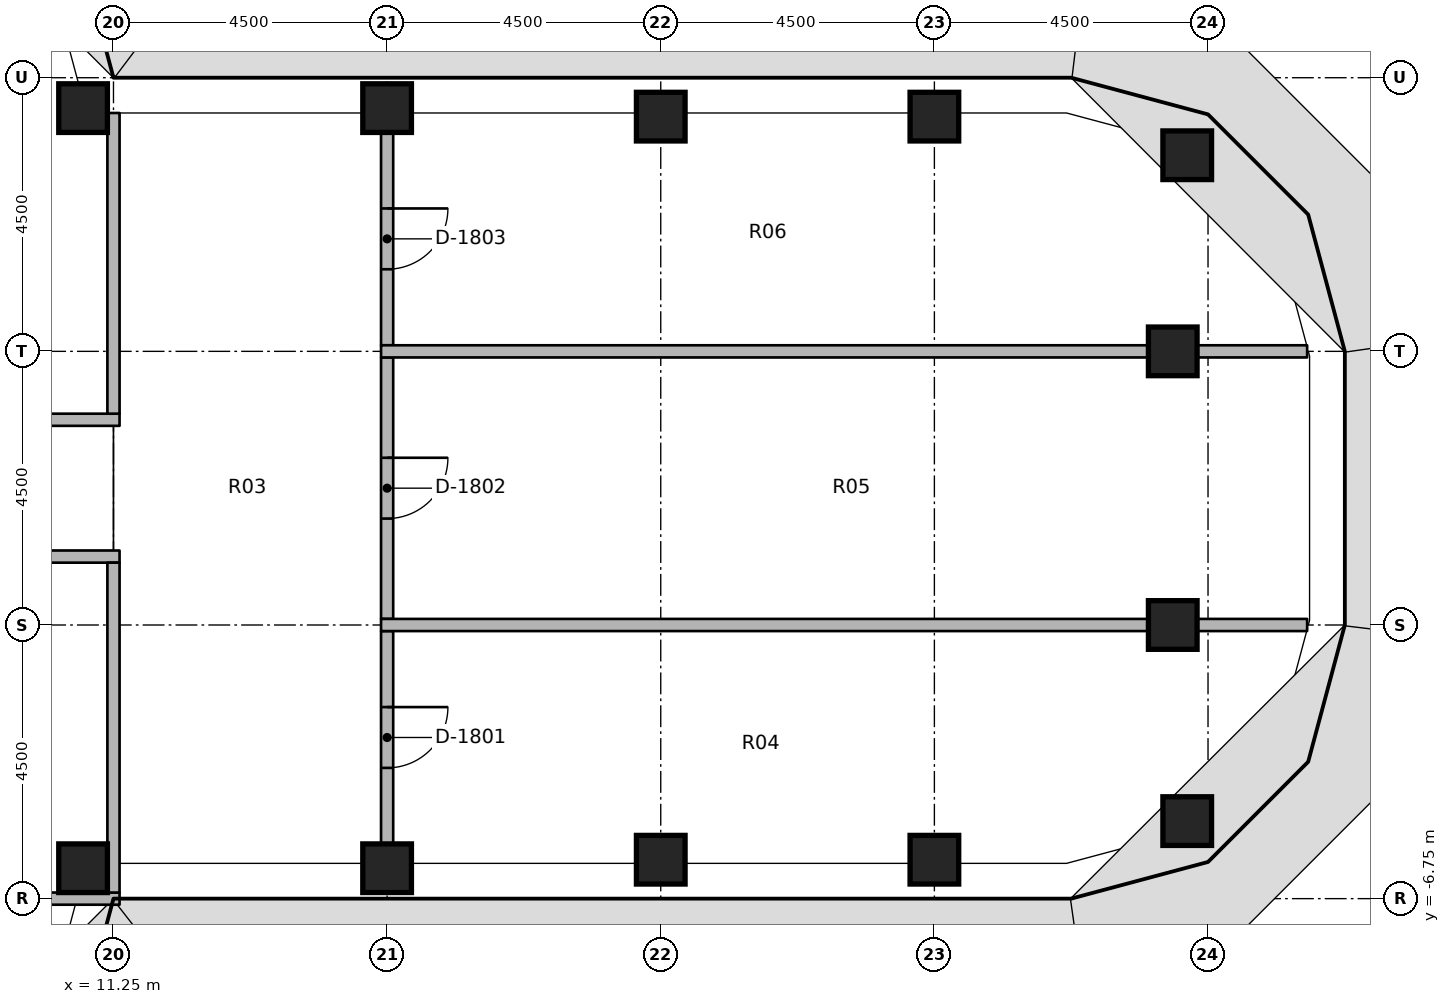
"""IFC4 building model, lengths in metres.
Left out: names, types, materials, properties, quantities, classifications, styles, units other than length and angle.
Written with IfcOpenShell. Run it as: python <this file> out.ifc"""

import sys

from ifc_helpers import new_model, si_unit, direction, frame, frame_2d, origin, origin_2d, place, context, subcontext, project, spatial, rectangle, extrude, element, fill, save


model = new_model("IFC4")
c1 = context("Model", 3, precision=1e-05, world=origin(), true_north=direction((0.0, 1.0)))
c2 = subcontext(c1, "Body", "Model", "MODEL_VIEW")
j1 = project(units=[si_unit("LENGTHUNIT", "METRE"), si_unit("PLANEANGLEUNIT", "RADIAN")], contexts=[c1])
p1 = place(None, origin())
s1 = spatial("IfcSite", under=j1, at=p1, CompositionType="ELEMENT")
p2 = place(p1, origin())
s2 = spatial("IfcBuilding", under=s1, at=p2, CompositionType="ELEMENT")
p3 = place(p2, frame((0.0, 0.0, 171.4)))
s3 = spatial("IfcBuildingStorey", under=s2, at=p3, CompositionType="ELEMENT", Elevation=171.4)
for number, where, z_axis, x_axis in (
    (1, (10.75, -6.25, 0.0), (0.0, 0.0, 1.0), (1.0, 0.0, 0.0)),
    (2, (10.75, 6.25, 0.0), (0.0, 0.0, 1.0), (1.0, 0.0, 0.0)),
    (3, (15.75, -6.25, 0.0), (0.0, 0.0, 1.0), (1.0, 0.0, 0.0)),
    (4, (15.75, 6.25, 0.0), (0.0, 0.0, 1.0), (1.0, 0.0, 0.0)),
    (5, (20.25, -6.11, 0.0), (0.0, 0.0, 1.0), (1.0, 0.0, 0.0)),
    (6, (20.25, 6.11, 0.0), (0.0, 0.0, 1.0), (1.0, 0.0, 0.0)),
    (7, (24.75, -6.11, 0.0), (0.0, 0.0, 1.0), (1.0, 0.0, 0.0)),
    (8, (24.75, 6.11, 0.0), (0.0, 0.0, 1.0), (1.0, 0.0, 0.0)),
    (9, (28.908, -5.475, 0.0), (0.0, 0.0, 1.0), (1.0, 0.0, 0.0)),
    (10, (28.67, -2.25, 0.0), (0.0, 0.0, 1.0), (1.0, 0.0, 0.0)),
    (11, (28.67, 2.25, 0.0), (0.0, 0.0, 1.0), (1.0, 0.0, 0.0)),
    (12, (28.908, 5.475, 0.0), (0.0, 0.0, 1.0), (1.0, 0.0, 0.0)),
):
    element("IfcColumn", number, at=place(p3, frame(where, z_axis=z_axis, x_axis=x_axis)), inside=s3, PredefinedType="COLUMN", context=c2, shape_type="SweptSolid", body=[
        extrude(rectangle(XDim=0.8, YDim=0.8, at=origin_2d()), origin(), (0.0, 0.0, 1.0), 3.65),
    ])
p4 = place(p3, frame((6.65, 1.125, 0.0), z_axis=(0.0, 0.0, 1.0), x_axis=(1.0, 0.0, 0.0)))
e13 = element("IfcWall", 13, at=p4, inside=s3, PredefinedType="PARTITIONING", context=c2, shape_type="SweptSolid", body=[
    extrude(rectangle(XDim=4.7, YDim=0.2, at=frame_2d((2.35, 0.0))), origin(), (0.0, 0.0, 1.0), 2.75),
])
p5 = place(p4, frame((1.85, 0.0, 0.0)))
e14 = element("IfcOpeningElement", 14, at=p5, cuts=e13, PredefinedType="OPENING", context=c2, shape_type="SweptSolid", body=[
    extrude(rectangle(XDim=1.0, YDim=2.1, at=frame_2d((0.5, 1.05))), frame((0.0, 0.11, 0.0), z_axis=(0.0, -1.0, 0.0), x_axis=(1.0, 0.0, 0.0)), (0.0, 0.0, 1.0), 0.22),
])
p6 = place(p3, frame((11.35, -1.125, 0.0), z_axis=(0.0, 0.0, 1.0), x_axis=(-1.0, 0.0, 0.0)))
e15 = element("IfcWall", 15, at=p6, inside=s3, PredefinedType="PARTITIONING", context=c2, shape_type="SweptSolid", body=[
    extrude(rectangle(XDim=4.7, YDim=0.2, at=frame_2d((2.35, 0.0))), origin(), (0.0, 0.0, 1.0), 2.75),
])
p7 = place(p6, frame((1.85, 0.0, 0.0)))
e16 = element("IfcOpeningElement", 16, at=p7, cuts=e15, PredefinedType="OPENING", context=c2, shape_type="SweptSolid", body=[
    extrude(rectangle(XDim=1.0, YDim=2.1, at=frame_2d((0.5, 1.05))), frame((0.0, 0.11, 0.0), z_axis=(0.0, -1.0, 0.0), x_axis=(1.0, 0.0, 0.0)), (0.0, 0.0, 1.0), 0.22),
])
p8 = place(p3, frame((11.25, 1.225, 0.0), z_axis=(0.0, 0.0, 1.0), x_axis=(0.0, 1.0, 0.0)))
e17 = element("IfcWall", 17, at=p8, inside=s3, PredefinedType="PARTITIONING", context=c2, shape_type="SweptSolid", body=[
    extrude(rectangle(XDim=4.945, YDim=0.2, at=frame_2d((2.472, 0.0))), origin(), (0.0, 0.0, 1.0), 2.75),
])
p9 = place(p3, frame((6.65, -6.75, 0.0), z_axis=(0.0, 0.0, 1.0), x_axis=(1.0, 0.0, 0.0)))
e18 = element("IfcWall", 18, at=p9, inside=s3, PredefinedType="PARTITIONING", context=c2, shape_type="SweptSolid", body=[
    extrude(rectangle(XDim=4.7, YDim=0.2, at=frame_2d((2.35, 0.0))), origin(), (0.0, 0.0, 1.0), 2.75),
])
p10 = place(p3, frame((11.25, -6.65, 0.0), z_axis=(0.0, 0.0, 1.0), x_axis=(0.0, 1.0, 0.0)))
e19 = element("IfcWall", 19, at=p10, inside=s3, PredefinedType="PARTITIONING", context=c2, shape_type="SweptSolid", body=[
    extrude(rectangle(XDim=5.425, YDim=0.2, at=frame_2d((2.712, 0.0))), origin(), (0.0, 0.0, 1.0), 2.75),
])
p11 = place(p3, frame((15.75, -2.35, 0.0), z_axis=(0.0, 0.0, 1.0), x_axis=(0.0, -1.0, 0.0)))
e20 = element("IfcWall", 20, at=p11, inside=s3, PredefinedType="PARTITIONING", context=c2, shape_type="SweptSolid", body=[
    extrude(rectangle(XDim=3.5, YDim=0.2, at=frame_2d((1.75, 0.0))), origin(), (0.0, 0.0, 1.0), 2.75),
])
p12 = place(p11, frame((1.25, 0.0, 0.0)))
e21 = element("IfcOpeningElement", 21, at=p12, cuts=e20, PredefinedType="OPENING", context=c2, shape_type="SweptSolid", body=[
    extrude(rectangle(XDim=1.0, YDim=2.1, at=frame_2d((0.5, 1.05))), frame((0.0, 0.11, 0.0), z_axis=(0.0, -1.0, 0.0), x_axis=(1.0, 0.0, 0.0)), (0.0, 0.0, 1.0), 0.22),
])
p13 = place(p3, frame((15.75, 2.15, 0.0), z_axis=(0.0, 0.0, 1.0), x_axis=(0.0, -1.0, 0.0)))
e22 = element("IfcWall", 22, at=p13, inside=s3, PredefinedType="PARTITIONING", context=c2, shape_type="SweptSolid", body=[
    extrude(rectangle(XDim=4.3, YDim=0.2, at=frame_2d((2.15, 0.0))), origin(), (0.0, 0.0, 1.0), 2.75),
])
p14 = place(p13, frame((1.65, 0.0, 0.0)))
e23 = element("IfcOpeningElement", 23, at=p14, cuts=e22, PredefinedType="OPENING", context=c2, shape_type="SweptSolid", body=[
    extrude(rectangle(XDim=1.0, YDim=2.1, at=frame_2d((0.5, 1.05))), frame((0.0, 0.11, 0.0), z_axis=(0.0, -1.0, 0.0), x_axis=(1.0, 0.0, 0.0)), (0.0, 0.0, 1.0), 0.22),
])
p15 = place(p3, frame((15.75, 5.85, 0.0), z_axis=(0.0, 0.0, 1.0), x_axis=(0.0, -1.0, 0.0)))
e24 = element("IfcWall", 24, at=p15, inside=s3, PredefinedType="PARTITIONING", context=c2, shape_type="SweptSolid", body=[
    extrude(rectangle(XDim=3.5, YDim=0.2, at=frame_2d((1.75, 0.0))), origin(), (0.0, 0.0, 1.0), 2.75),
])
p16 = place(p15, frame((1.25, 0.0, 0.0)))
e25 = element("IfcOpeningElement", 25, at=p16, cuts=e24, PredefinedType="OPENING", context=c2, shape_type="SweptSolid", body=[
    extrude(rectangle(XDim=1.0, YDim=2.1, at=frame_2d((0.5, 1.05))), frame((0.0, 0.11, 0.0), z_axis=(0.0, -1.0, 0.0), x_axis=(1.0, 0.0, 0.0)), (0.0, 0.0, 1.0), 0.22),
])
p17 = place(p3, frame((15.65, -2.25, 0.0), z_axis=(0.0, 0.0, 1.0), x_axis=(1.0, 0.0, 0.0)))
e26 = element("IfcWall", 26, at=p17, inside=s3, PredefinedType="PARTITIONING", context=c2, shape_type="SweptSolid", body=[
    extrude(rectangle(XDim=12.62, YDim=0.2, at=frame_2d((6.31, 0.0))), origin(), (0.0, 0.0, 1.0), 2.75),
])
p18 = place(p3, frame((29.07, -2.25, 0.0), z_axis=(0.0, 0.0, 1.0), x_axis=(1.0, 0.0, 0.0)))
e27 = element("IfcWall", 27, at=p18, inside=s3, PredefinedType="PARTITIONING", context=c2, shape_type="SweptSolid", body=[
    extrude(rectangle(XDim=1.81, YDim=0.2, at=frame_2d((0.905, 0.0))), origin(), (0.0, 0.0, 1.0), 2.75),
])
p19 = place(p3, frame((15.65, 2.25, 0.0), z_axis=(0.0, 0.0, 1.0), x_axis=(1.0, 0.0, 0.0)))
e28 = element("IfcWall", 28, at=p19, inside=s3, PredefinedType="PARTITIONING", context=c2, shape_type="SweptSolid", body=[
    extrude(rectangle(XDim=12.62, YDim=0.2, at=frame_2d((6.31, 0.0))), origin(), (0.0, 0.0, 1.0), 2.75),
])
p20 = place(p3, frame((29.07, 2.25, 0.0), z_axis=(0.0, 0.0, 1.0), x_axis=(1.0, 0.0, 0.0)))
e29 = element("IfcWall", 29, at=p20, inside=s3, PredefinedType="PARTITIONING", context=c2, shape_type="SweptSolid", body=[
    extrude(rectangle(XDim=1.81, YDim=0.2, at=frame_2d((0.905, 0.0))), origin(), (0.0, 0.0, 1.0), 2.75),
])
p21 = place(p12, origin())
e30 = element("IfcDoor", 30, at=p21, inside=s3, OperationType="SINGLE_SWING_LEFT", PredefinedType="DOOR", context=c2, shape_type="SweptSolid", body=[
    extrude(rectangle(XDim=1.0, YDim=2.1, at=frame_2d((0.5, 1.05))), frame((0.0, 0.025, 0.0), z_axis=(0.0, -1.0, 0.0), x_axis=(1.0, 0.0, 0.0)), (0.0, 0.0, 1.0), 0.05),
])
fill(e21, e30)
p22 = place(p14, origin())
e31 = element("IfcDoor", 31, at=p22, inside=s3, OperationType="SINGLE_SWING_RIGHT", PredefinedType="DOOR", context=c2, shape_type="SweptSolid", body=[
    extrude(rectangle(XDim=1.0, YDim=2.1, at=frame_2d((0.5, 1.05))), frame((0.0, 0.025, 0.0), z_axis=(0.0, -1.0, 0.0), x_axis=(1.0, 0.0, 0.0)), (0.0, 0.0, 1.0), 0.05),
])
fill(e23, e31)
p23 = place(p16, origin())
e32 = element("IfcDoor", 32, at=p23, inside=s3, OperationType="SINGLE_SWING_RIGHT", PredefinedType="DOOR", context=c2, shape_type="SweptSolid", body=[
    extrude(rectangle(XDim=1.0, YDim=2.1, at=frame_2d((0.5, 1.05))), frame((0.0, 0.025, 0.0), z_axis=(0.0, -1.0, 0.0), x_axis=(1.0, 0.0, 0.0)), (0.0, 0.0, 1.0), 0.05),
])
fill(e25, e32)
save(model, sys.argv[1])
